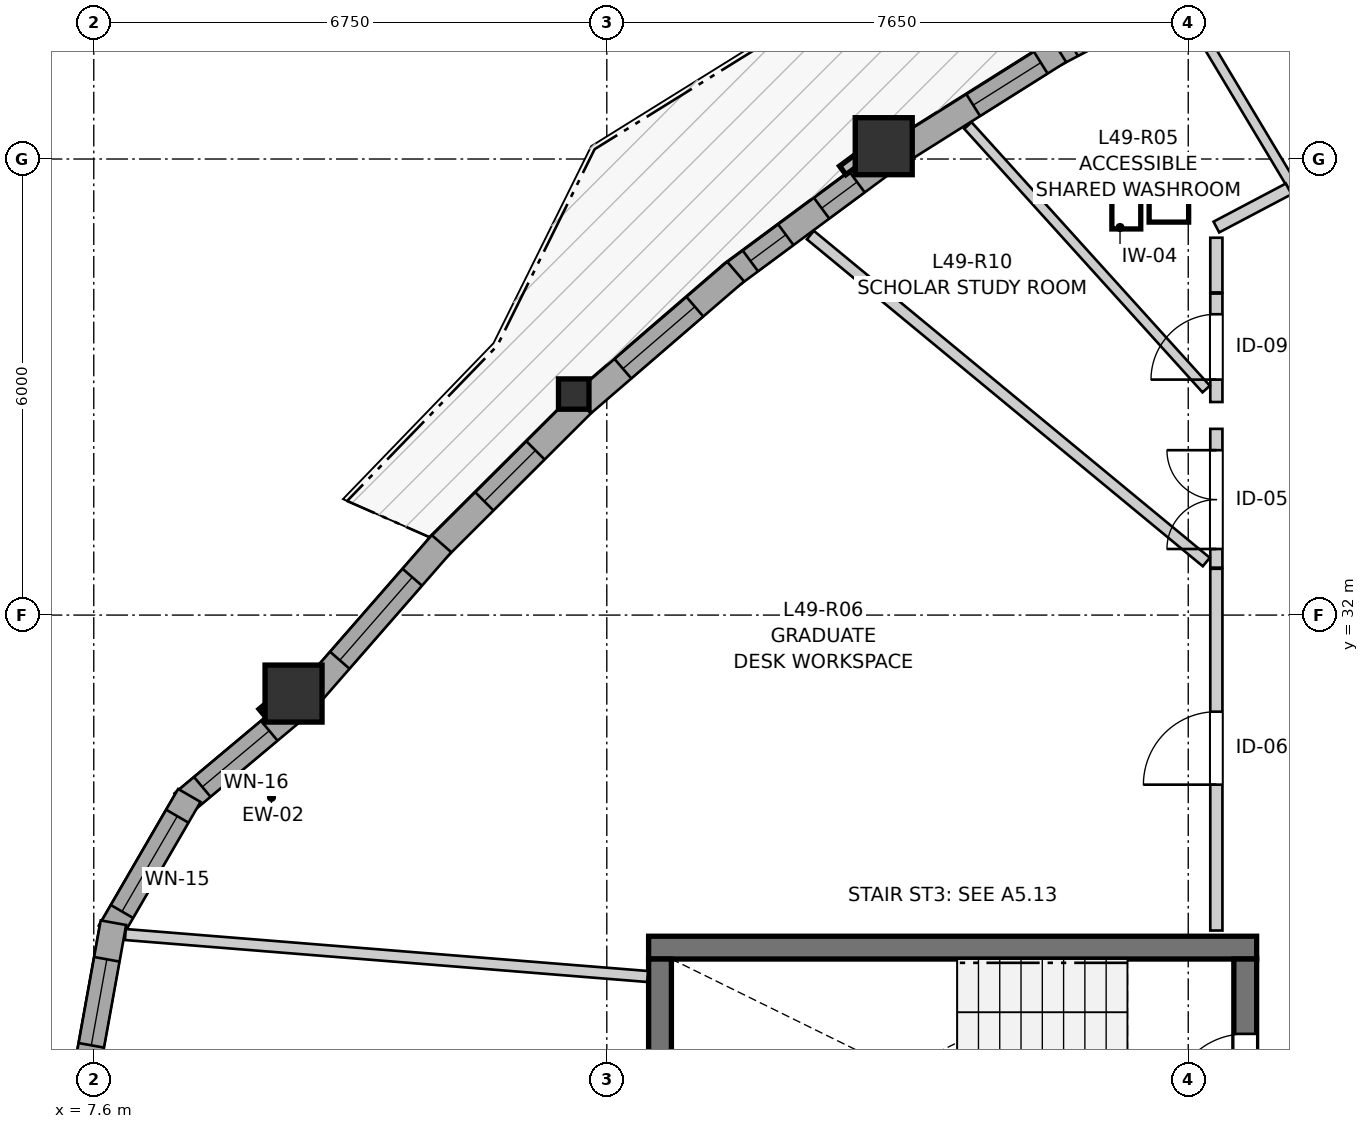
"""IFC4 building model, lengths in metres.
Left out: names, types, materials, properties, quantities, classifications, styles, units other than length and angle.
Written with IfcOpenShell. Run it as: python <this file> out.ifc"""

import sys

from ifc_helpers import new_model, si_unit, direction, frame, frame_2d, origin, origin_2d, place, context, subcontext, project, spatial, rectangle, i_section, extrude, source, transform, mapped, element, fill, save


model = new_model("IFC4")
c1 = context("Model", 3, precision=1e-05, world=origin(), true_north=direction((0.0, 1.0)))
c2 = subcontext(c1, "Body", "Model", "MODEL_VIEW")
j1 = project(units=[si_unit("LENGTHUNIT", "METRE"), si_unit("PLANEANGLEUNIT", "RADIAN")], contexts=[c1])
p1 = place(None, origin())
s1 = spatial("IfcSite", under=j1, at=p1, CompositionType="ELEMENT")
p2 = place(p1, origin())
s2 = spatial("IfcBuilding", under=s1, at=p2, CompositionType="ELEMENT")
p3 = place(p2, frame((0.0, 0.0, 165.0)))
s3 = spatial("IfcBuildingStorey", under=s2, at=p3, CompositionType="ELEMENT", Elevation=165.0)
p4 = place(p3, frame((22.9, 27.625, 0.0), z_axis=(0.0, 0.0, 1.0), x_axis=(-1.0, 0.0, 0.0)))
e1 = element("IfcWall", 1, at=p4, inside=s3, PredefinedType="SHEAR", context=c2, shape_type="SweptSolid", body=[
    extrude(rectangle(XDim=8.0, YDim=0.3, at=frame_2d((4.0, 0.0))), origin(), (0.0, 0.0, 1.0), 2.95),
])
p5 = place(p3, frame((15.05, 27.475, 0.0), z_axis=(0.0, 0.0, 1.0), x_axis=(0.0, -1.0, 0.0)))
e2 = element("IfcWall", 2, at=p5, inside=s3, PredefinedType="SHEAR", context=c2, shape_type="SweptSolid", body=[
    extrude(rectangle(XDim=2.95, YDim=0.3, at=frame_2d((1.475, 0.0))), origin(), (0.0, 0.0, 1.0), 2.95),
])
p6 = place(p3, frame((22.75, 24.525, 0.0), z_axis=(0.0, 0.0, 1.0), x_axis=(0.0, 1.0, 0.0)))
e3 = element("IfcWall", 3, at=p6, inside=s3, PredefinedType="SHEAR", context=c2, shape_type="SweptSolid", body=[
    extrude(rectangle(XDim=2.95, YDim=0.3, at=frame_2d((1.475, 0.0))), origin(), (0.0, 0.0, 1.0), 2.95),
])
p7 = place(p6, frame((0.985, 0.0, 0.0)))
e4 = element("IfcOpeningElement", 4, at=p7, cuts=e3, PredefinedType="OPENING", context=c2, shape_type="SweptSolid", body=[
    extrude(rectangle(XDim=0.98, YDim=2.15, at=frame_2d((0.49, 1.075))), frame((0.0, 0.16, 0.0), z_axis=(0.0, -1.0, 0.0), x_axis=(1.0, 0.0, 0.0)), (0.0, 0.0, 1.0), 0.32),
])
m1 = source(origin(), c2, "Body", "SweptSolid", [
    extrude(rectangle(XDim=0.75, YDim=0.75, at=origin_2d()), origin(), (0.0, 0.0, 1.0), 2.95),
])
for number, where, z_axis, x_axis in (
    (5, (10.229, 30.967, 0.0), (0.0, 0.0, 1.0), (1.0, 0.0, 0.0)),
    (6, (17.994, 38.169, 0.0), (0.0, 0.0, 1.0), (1.0, 0.0, 0.0)),
):
    element("IfcColumn", number, at=place(p3, frame(where, z_axis=z_axis, x_axis=x_axis)), inside=s3, PredefinedType="COLUMN", context=c2, shape_type="MappedRepresentation", body=[
        mapped(m1, transform((0.0, 0.0, 0.0), x_axis=(1.0, 0.0, 0.0), y_axis=(0.0, 1.0, 0.0), z_axis=(0.0, 0.0, 1.0), scale=1.0)),
    ])
m2 = source(origin(), c2, "Body", "SweptSolid", [
    extrude(i_section(OverallWidth=0.401, OverallDepth=0.399, WebThickness=0.023, FlangeThickness=0.036, FilletRadius=0.015, at=origin_2d()), origin(), (0.0, 0.0, 1.0), 2.95),
])
p8 = place(p3, frame((13.915, 34.908, 0.0), z_axis=(0.0, 0.0, 1.0), x_axis=(1.0, 0.0, 0.0)))
e7 = element("IfcColumn", 7, at=p8, inside=s3, PredefinedType="PILASTER", context=c2, shape_type="MappedRepresentation", body=[
    mapped(m2, transform((0.0, 0.0, 0.0), x_axis=(1.0, 0.0, 0.0), y_axis=(0.0, 1.0, 0.0), z_axis=(0.0, 0.0, 1.0), scale=1.0)),
])
p9 = place(p3, frame((10.219, 30.737, 0.0), z_axis=(0.0, 0.0, 1.0), x_axis=(-0.76661852922, -0.642102819381, 0.0)))
e8 = element("IfcWall", 8, at=p9, inside=s3, PredefinedType="SOLIDWALL", context=c2, shape_type="SweptSolid", body=[
    extrude(rectangle(XDim=1.888, YDim=0.34, at=frame_2d((0.944, 0.0))), origin(), (0.0, 0.0, 1.0), 2.53),
])
p10 = place(p9, frame((0.404, 0.0, 0.82)))
e9 = element("IfcOpeningElement", 9, at=p10, cuts=e8, PredefinedType="OPENING", context=c2, shape_type="SweptSolid", body=[
    extrude(rectangle(XDim=1.15, YDim=1.2, at=frame_2d((0.575, 0.6))), frame((0.0, 0.18, 0.0), z_axis=(0.0, -1.0, 0.0), x_axis=(1.0, 0.0, 0.0)), (0.0, 0.0, 1.0), 0.36),
])
p11 = place(p3, frame((8.858, 29.627, 0.0), z_axis=(0.0, 0.0, 1.0), x_axis=(-0.502177965272, -0.864764298058, 0.0)))
e10 = element("IfcWall", 10, at=p11, inside=s3, PredefinedType="SOLIDWALL", context=c2, shape_type="SweptSolid", body=[
    extrude(rectangle(XDim=2.081, YDim=0.34, at=frame_2d((1.041, 0.0))), origin(), (0.0, 0.0, 1.0), 2.53),
])
p12 = place(p11, frame((0.315, 0.0, 0.82)))
e11 = element("IfcOpeningElement", 11, at=p12, cuts=e10, PredefinedType="OPENING", context=c2, shape_type="SweptSolid", body=[
    extrude(rectangle(XDim=1.45, YDim=1.25, at=frame_2d((0.725, 0.625))), frame((0.0, 0.18, 0.0), z_axis=(0.0, -1.0, 0.0), x_axis=(1.0, 0.0, 0.0)), (0.0, 0.0, 1.0), 0.36),
])
p13 = place(p3, frame((7.859, 27.953, 0.0), z_axis=(0.0, 0.0, 1.0), x_axis=(-0.177605215389, -0.984101817632, 0.0)))
e12 = element("IfcWall", 12, at=p13, inside=s3, PredefinedType="SOLIDWALL", context=c2, shape_type="SweptSolid", body=[
    extrude(rectangle(XDim=2.081, YDim=0.34, at=frame_2d((1.041, 0.0))), origin(), (0.0, 0.0, 1.0), 2.53),
])
p14 = place(p13, frame((0.489, 0.0, 0.82)))
e13 = element("IfcOpeningElement", 13, at=p14, cuts=e12, PredefinedType="OPENING", context=c2, shape_type="SweptSolid", body=[
    extrude(rectangle(XDim=1.15, YDim=1.2, at=frame_2d((0.575, 0.6))), frame((0.0, 0.18, 0.0), z_axis=(0.0, -1.0, 0.0), x_axis=(1.0, 0.0, 0.0)), (0.0, 0.0, 1.0), 0.36),
])
p15 = place(p3, frame((22.526, 40.591, 0.0), z_axis=(0.0, 0.0, 1.0), x_axis=(-0.884394438343, -0.46674026763, 0.0)))
e14 = element("IfcWall", 14, at=p15, inside=s3, PredefinedType="SOLIDWALL", context=c2, shape_type="SweptSolid", body=[
    extrude(rectangle(XDim=2.601, YDim=0.34, at=frame_2d((1.301, 0.0))), origin(), (0.0, 0.0, 1.0), 2.53),
])
p16 = place(p15, frame((0.977, 0.0, 0.82)))
e15 = element("IfcOpeningElement", 15, at=p16, cuts=e14, PredefinedType="OPENING", context=c2, shape_type="SweptSolid", body=[
    extrude(rectangle(XDim=1.35, YDim=1.45, at=frame_2d((0.675, 0.725))), frame((0.0, 0.18, 0.0), z_axis=(0.0, -1.0, 0.0), x_axis=(1.0, 0.0, 0.0)), (0.0, 0.0, 1.0), 0.36),
])
p17 = place(p3, frame((20.303, 39.421, 0.0), z_axis=(0.0, 0.0, 1.0), x_axis=(-0.846381586821, -0.532576951707, 0.0)))
e16 = element("IfcWall", 16, at=p17, inside=s3, PredefinedType="SOLIDWALL", context=c2, shape_type="SweptSolid", body=[
    extrude(rectangle(XDim=2.466, YDim=0.34, at=frame_2d((1.233, 0.0))), origin(), (0.0, 0.0, 1.0), 2.53),
])
p18 = place(p17, frame((0.287, 0.0, 0.82)))
e17 = element("IfcOpeningElement", 17, at=p18, cuts=e16, PredefinedType="OPENING", context=c2, shape_type="SweptSolid", body=[
    extrude(rectangle(XDim=1.05, YDim=1.45, at=frame_2d((0.525, 0.725))), frame((0.0, 0.18, 0.0), z_axis=(0.0, -1.0, 0.0), x_axis=(1.0, 0.0, 0.0)), (0.0, 0.0, 1.0), 0.36),
])
p19 = place(p3, frame((17.97, 37.94, 0.0), z_axis=(0.0, 0.0, 1.0), x_axis=(-0.803844722302, -0.594839190393, 0.0)))
e18 = element("IfcWall", 18, at=p19, inside=s3, PredefinedType="SOLIDWALL", context=c2, shape_type="SweptSolid", body=[
    extrude(rectangle(XDim=2.481, YDim=0.34, at=frame_2d((1.24, 0.0))), origin(), (0.0, 0.0, 1.0), 2.53),
])
p20 = place(p19, frame((0.407, 0.0, 0.82)))
e19 = element("IfcOpeningElement", 19, at=p20, cuts=e18, PredefinedType="OPENING", context=c2, shape_type="SweptSolid", body=[
    extrude(rectangle(XDim=0.58, YDim=1.35, at=frame_2d((0.29, 0.675))), frame((0.0, 0.18, 0.0), z_axis=(0.0, -1.0, 0.0), x_axis=(1.0, 0.0, 0.0)), (0.0, 0.0, 1.0), 0.36),
])
p21 = place(p19, frame((1.573, 0.0, 0.82)))
e20 = element("IfcOpeningElement", 20, at=p21, cuts=e18, PredefinedType="OPENING", context=c2, shape_type="SweptSolid", body=[
    extrude(rectangle(XDim=0.58, YDim=1.35, at=frame_2d((0.29, 0.675))), frame((0.0, 0.18, 0.0), z_axis=(0.0, -1.0, 0.0), x_axis=(1.0, 0.0, 0.0)), (0.0, 0.0, 1.0), 0.36),
])
p22 = place(p3, frame((16.045, 36.519, 0.0), z_axis=(0.0, 0.0, 1.0), x_axis=(-0.757449302754, -0.652893983551, 0.0)))
e21 = element("IfcWall", 21, at=p22, inside=s3, PredefinedType="SOLIDWALL", context=c2, shape_type="SweptSolid", body=[
    extrude(rectangle(XDim=2.646, YDim=0.34, at=frame_2d((1.323, 0.0))), origin(), (0.0, 0.0, 1.0), 2.53),
])
p23 = place(p22, frame((0.708, 0.0, 0.82)))
e22 = element("IfcOpeningElement", 22, at=p23, cuts=e21, PredefinedType="OPENING", context=c2, shape_type="SweptSolid", body=[
    extrude(rectangle(XDim=1.25, YDim=1.35, at=frame_2d((0.625, 0.675))), frame((0.0, 0.18, 0.0), z_axis=(0.0, -1.0, 0.0), x_axis=(1.0, 0.0, 0.0)), (0.0, 0.0, 1.0), 0.36),
])
p24 = place(p3, frame((14.021, 34.773, 0.0), z_axis=(0.0, 0.0, 1.0), x_axis=(-0.708421987765, -0.705789123784, 0.0)))
e23 = element("IfcWall", 23, at=p24, inside=s3, PredefinedType="SOLIDWALL", context=c2, shape_type="SweptSolid", body=[
    extrude(rectangle(XDim=2.689, YDim=0.34, at=frame_2d((1.345, 0.0))), origin(), (0.0, 0.0, 1.0), 2.53),
])
p25 = place(p24, frame((0.86, 0.0, 0.82)))
e24 = element("IfcOpeningElement", 24, at=p25, cuts=e23, PredefinedType="OPENING", context=c2, shape_type="SweptSolid", body=[
    extrude(rectangle(XDim=0.95, YDim=1.35, at=frame_2d((0.475, 0.675))), frame((0.0, 0.18, 0.0), z_axis=(0.0, -1.0, 0.0), x_axis=(1.0, 0.0, 0.0)), (0.0, 0.0, 1.0), 0.36),
])
p26 = place(p3, frame((12.176, 32.939, 0.0), z_axis=(0.0, 0.0, 1.0), x_axis=(-0.65766354423, -0.753311796397, 0.0)))
e25 = element("IfcWall", 25, at=p26, inside=s3, PredefinedType="SOLIDWALL", context=c2, shape_type="SweptSolid", body=[
    extrude(rectangle(XDim=2.611, YDim=0.34, at=frame_2d((1.306, 0.0))), origin(), (0.0, 0.0, 1.0), 2.53),
])
p27 = place(p26, frame((0.586, 0.0, 0.82)))
e26 = element("IfcOpeningElement", 26, at=p27, cuts=e25, PredefinedType="OPENING", context=c2, shape_type="SweptSolid", body=[
    extrude(rectangle(XDim=1.45, YDim=1.25, at=frame_2d((0.725, 0.625))), frame((0.0, 0.18, 0.0), z_axis=(0.0, -1.0, 0.0), x_axis=(1.0, 0.0, 0.0)), (0.0, 0.0, 1.0), 0.36),
])
p28 = place(p3, frame((22.37, 27.85, 0.0), z_axis=(0.0, 0.0, 1.0), x_axis=(0.0, 1.0, 0.0)))
e27 = element("IfcWall", 27, at=p28, inside=s3, PredefinedType="PARTITIONING", context=c2, shape_type="SweptSolid", body=[
    extrude(rectangle(XDim=4.759, YDim=0.16, at=frame_2d((2.379, 0.0))), origin(), (0.0, 0.0, 1.0), 2.95),
])
p29 = place(p28, frame((1.919, 0.0, 0.0)))
e28 = element("IfcOpeningElement", 28, at=p29, cuts=e27, PredefinedType="OPENING", context=c2, shape_type="SweptSolid", body=[
    extrude(rectangle(XDim=0.96, YDim=2.1, at=frame_2d((0.48, 1.05))), frame((0.0, 0.09, 0.0), z_axis=(0.0, -1.0, 0.0), x_axis=(1.0, 0.0, 0.0)), (0.0, 0.0, 1.0), 0.18),
])
p30 = place(p3, frame((22.37, 32.624, 0.0), z_axis=(0.0, 0.0, 1.0), x_axis=(0.0, 1.0, 0.0)))
e29 = element("IfcWall", 29, at=p30, inside=s3, PredefinedType="PARTITIONING", context=c2, shape_type="SweptSolid", body=[
    extrude(rectangle(XDim=1.826, YDim=0.16, at=frame_2d((0.913, 0.0))), origin(), (0.0, 0.0, 1.0), 2.95),
])
p31 = place(p30, frame((0.246, 0.0, 0.0)))
e30 = element("IfcOpeningElement", 30, at=p31, cuts=e29, PredefinedType="OPENING", context=c2, shape_type="SweptSolid", body=[
    extrude(rectangle(XDim=1.3, YDim=2.1, at=frame_2d((0.65, 1.05))), frame((0.0, 0.09, 0.0), z_axis=(0.0, -1.0, 0.0), x_axis=(1.0, 0.0, 0.0)), (0.0, 0.0, 1.0), 0.18),
])
p32 = place(p3, frame((22.37, 34.803, 0.0), z_axis=(0.0, 0.0, 1.0), x_axis=(0.0, 1.0, 0.0)))
e31 = element("IfcWall", 31, at=p32, inside=s3, PredefinedType="PARTITIONING", context=c2, shape_type="SweptSolid", body=[
    extrude(rectangle(XDim=1.427, YDim=0.16, at=frame_2d((0.713, 0.0))), origin(), (0.0, 0.0, 1.0), 2.95),
])
p33 = place(p32, frame((0.295, 0.0, 0.0)))
e32 = element("IfcOpeningElement", 32, at=p33, cuts=e31, PredefinedType="OPENING", context=c2, shape_type="SweptSolid", body=[
    extrude(rectangle(XDim=0.86, YDim=2.05, at=frame_2d((0.43, 1.025))), frame((0.0, 0.09, 0.0), z_axis=(0.0, -1.0, 0.0), x_axis=(1.0, 0.0, 0.0)), (0.0, 0.0, 1.0), 0.18),
])
p34 = place(p3, frame((17.028, 37.0, 0.0), z_axis=(0.0, 0.0, 1.0), x_axis=(0.771119105053, -0.636690918596, 0.0)))
e33 = element("IfcWall", 33, at=p34, inside=s3, PredefinedType="PARTITIONING", context=c2, shape_type="SweptSolid", body=[
    extrude(rectangle(XDim=6.756, YDim=0.145, at=frame_2d((3.378, 0.0))), origin(), (0.0, 0.0, 1.0), 2.95),
])
p35 = place(p3, frame((8.015, 27.797, 0.0), z_axis=(0.0, 0.0, 1.0), x_axis=(0.996785477909, -0.080116858581, 0.0)))
e34 = element("IfcWall", 34, at=p35, inside=s3, PredefinedType="PARTITIONING", context=c2, shape_type="SweptSolid", body=[
    extrude(rectangle(XDim=6.893, YDim=0.145, at=frame_2d((3.447, 0.0))), origin(), (0.0, 0.0, 1.0), 2.95),
])
p36 = place(p3, frame((19.101, 38.441, 0.0), z_axis=(0.0, 0.0, 1.0), x_axis=(0.670702711046, -0.741726279295, 0.0)))
e35 = element("IfcWall", 35, at=p36, inside=s3, PredefinedType="PARTITIONING", context=c2, shape_type="SweptSolid", body=[
    extrude(rectangle(XDim=4.675, YDim=0.13, at=frame_2d((2.337, 0.0))), origin(), (0.0, 0.0, 1.0), 2.95),
])
p37 = place(p3, frame((21.92, 40.065, 0.0), z_axis=(0.0, 0.0, 1.0), x_axis=(0.514051974364, -0.857759038223, 0.0)))
e36 = element("IfcWall", 36, at=p37, inside=s3, PredefinedType="PARTITIONING", context=c2, shape_type="SweptSolid", body=[
    extrude(rectangle(XDim=2.832, YDim=0.13, at=frame_2d((1.416, 0.0))), origin(), (0.0, 0.0, 1.0), 2.95),
])
p38 = place(p3, frame((22.37, 37.105, 0.0), z_axis=(0.0, 0.0, 1.0), x_axis=(0.884455008011, 0.466625480234, 0.0)))
e37 = element("IfcWall", 37, at=p38, inside=s3, PredefinedType="PARTITIONING", context=c2, shape_type="SweptSolid", body=[
    extrude(rectangle(XDim=1.076, YDim=0.16, at=frame_2d((0.538, 0.0))), origin(), (0.0, 0.0, 1.0), 2.558),
])
p39 = place(p3, frame((22.37, 36.245, 0.0), z_axis=(0.0, 0.0, 1.0), x_axis=(0.0, 1.0, 0.0)))
e38 = element("IfcWall", 38, at=p39, inside=s3, PredefinedType="PARTITIONING", context=c2, shape_type="SweptSolid", body=[
    extrude(rectangle(XDim=0.719, YDim=0.16, at=frame_2d((0.36, 0.0))), origin(), (0.0, 0.0, 1.0), 2.95),
])
m3 = source(origin(), c2, "Body", "SweptSolid", [
    extrude(rectangle(XDim=1.15, YDim=1.2, at=frame_2d((0.575, 0.6))), frame((0.0, 0.03, 0.0), z_axis=(0.0, -1.0, 0.0), x_axis=(1.0, 0.0, 0.0)), (0.0, 0.0, 1.0), 0.06),
])
p40 = place(p10, origin())
e39 = element("IfcWindow", 39, at=p40, inside=s3, PartitioningType="SINGLE_PANEL", PredefinedType="WINDOW", context=c2, shape_type="MappedRepresentation", body=[
    mapped(m3, transform((0.0, 0.0, 0.0), x_axis=(1.0, 0.0, 0.0), y_axis=(0.0, 1.0, 0.0), z_axis=(0.0, 0.0, 1.0), scale=1.0)),
])
fill(e9, e39)
m4 = source(origin(), c2, "Body", "SweptSolid", [
    extrude(rectangle(XDim=1.45, YDim=1.25, at=frame_2d((0.725, 0.625))), frame((0.0, 0.03, 0.0), z_axis=(0.0, -1.0, 0.0), x_axis=(1.0, 0.0, 0.0)), (0.0, 0.0, 1.0), 0.06),
])
p41 = place(p12, origin())
e40 = element("IfcWindow", 40, at=p41, inside=s3, PartitioningType="SINGLE_PANEL", PredefinedType="WINDOW", context=c2, shape_type="MappedRepresentation", body=[
    mapped(m4, transform((0.0, 0.0, 0.0), x_axis=(1.0, 0.0, 0.0), y_axis=(0.0, 1.0, 0.0), z_axis=(0.0, 0.0, 1.0), scale=1.0)),
])
fill(e11, e40)
p42 = place(p14, origin())
e41 = element("IfcWindow", 41, at=p42, inside=s3, PartitioningType="SINGLE_PANEL", PredefinedType="WINDOW", context=c2, shape_type="MappedRepresentation", body=[
    mapped(m3, transform((0.0, 0.0, 0.0), x_axis=(1.0, 0.0, 0.0), y_axis=(0.0, 1.0, 0.0), z_axis=(0.0, 0.0, 1.0), scale=1.0)),
])
fill(e13, e41)
m5 = source(origin(), c2, "Body", "SweptSolid", [
    extrude(rectangle(XDim=1.05, YDim=1.45, at=frame_2d((0.525, 0.725))), frame((0.0, 0.03, 0.0), z_axis=(0.0, -1.0, 0.0), x_axis=(1.0, 0.0, 0.0)), (0.0, 0.0, 1.0), 0.06),
])
p43 = place(p18, origin())
e42 = element("IfcWindow", 42, at=p43, inside=s3, PartitioningType="SINGLE_PANEL", PredefinedType="WINDOW", context=c2, shape_type="MappedRepresentation", body=[
    mapped(m5, transform((0.0, 0.0, 0.0), x_axis=(1.0, 0.0, 0.0), y_axis=(0.0, 1.0, 0.0), z_axis=(0.0, 0.0, 1.0), scale=1.0)),
])
fill(e17, e42)
m6 = source(origin(), c2, "Body", "SweptSolid", [
    extrude(rectangle(XDim=0.58, YDim=1.35, at=frame_2d((0.29, 0.675))), frame((0.0, 0.03, 0.0), z_axis=(0.0, -1.0, 0.0), x_axis=(1.0, 0.0, 0.0)), (0.0, 0.0, 1.0), 0.06),
])
p44 = place(p20, origin())
e43 = element("IfcWindow", 43, at=p44, inside=s3, PartitioningType="SINGLE_PANEL", PredefinedType="WINDOW", context=c2, shape_type="MappedRepresentation", body=[
    mapped(m6, transform((0.0, 0.0, 0.0), x_axis=(1.0, 0.0, 0.0), y_axis=(0.0, 1.0, 0.0), z_axis=(0.0, 0.0, 1.0), scale=1.0)),
])
fill(e19, e43)
p45 = place(p21, origin())
e44 = element("IfcWindow", 44, at=p45, inside=s3, PartitioningType="SINGLE_PANEL", PredefinedType="WINDOW", context=c2, shape_type="MappedRepresentation", body=[
    mapped(m6, transform((0.0, 0.0, 0.0), x_axis=(1.0, 0.0, 0.0), y_axis=(0.0, 1.0, 0.0), z_axis=(0.0, 0.0, 1.0), scale=1.0)),
])
fill(e20, e44)
m7 = source(origin(), c2, "Body", "SweptSolid", [
    extrude(rectangle(XDim=1.25, YDim=1.35, at=frame_2d((0.625, 0.675))), frame((0.0, 0.03, 0.0), z_axis=(0.0, -1.0, 0.0), x_axis=(1.0, 0.0, 0.0)), (0.0, 0.0, 1.0), 0.06),
])
p46 = place(p23, origin())
e45 = element("IfcWindow", 45, at=p46, inside=s3, PartitioningType="SINGLE_PANEL", PredefinedType="WINDOW", context=c2, shape_type="MappedRepresentation", body=[
    mapped(m7, transform((0.0, 0.0, 0.0), x_axis=(1.0, 0.0, 0.0), y_axis=(0.0, 1.0, 0.0), z_axis=(0.0, 0.0, 1.0), scale=1.0)),
])
fill(e22, e45)
m8 = source(origin(), c2, "Body", "SweptSolid", [
    extrude(rectangle(XDim=0.95, YDim=1.35, at=frame_2d((0.475, 0.675))), frame((0.0, 0.03, 0.0), z_axis=(0.0, -1.0, 0.0), x_axis=(1.0, 0.0, 0.0)), (0.0, 0.0, 1.0), 0.06),
])
p47 = place(p25, origin())
e46 = element("IfcWindow", 46, at=p47, inside=s3, PartitioningType="SINGLE_PANEL", PredefinedType="WINDOW", context=c2, shape_type="MappedRepresentation", body=[
    mapped(m8, transform((0.0, 0.0, 0.0), x_axis=(1.0, 0.0, 0.0), y_axis=(0.0, 1.0, 0.0), z_axis=(0.0, 0.0, 1.0), scale=1.0)),
])
fill(e24, e46)
p48 = place(p27, origin())
e47 = element("IfcWindow", 47, at=p48, inside=s3, PartitioningType="SINGLE_PANEL", PredefinedType="WINDOW", context=c2, shape_type="MappedRepresentation", body=[
    mapped(m4, transform((0.0, 0.0, 0.0), x_axis=(1.0, 0.0, 0.0), y_axis=(0.0, 1.0, 0.0), z_axis=(0.0, 0.0, 1.0), scale=1.0)),
])
fill(e26, e47)
m9 = source(origin(), c2, "Body", "SweptSolid", [
    extrude(rectangle(XDim=0.98, YDim=2.15, at=frame_2d((0.49, 1.075))), frame((0.0, 0.025, 0.0), z_axis=(0.0, -1.0, 0.0), x_axis=(1.0, 0.0, 0.0)), (0.0, 0.0, 1.0), 0.05),
])
p49 = place(p7, origin())
e48 = element("IfcDoor", 48, at=p49, inside=s3, OperationType="SINGLE_SWING_LEFT", PredefinedType="DOOR", context=c2, shape_type="MappedRepresentation", body=[
    mapped(m9, transform((0.0, 0.0, 0.0), x_axis=(1.0, 0.0, 0.0), y_axis=(0.0, 1.0, 0.0), z_axis=(0.0, 0.0, 1.0), scale=1.0)),
])
fill(e4, e48)
m10 = source(origin(), c2, "Body", "SweptSolid", [
    extrude(rectangle(XDim=0.96, YDim=2.1, at=frame_2d((0.48, 1.05))), frame((0.0, 0.025, 0.0), z_axis=(0.0, -1.0, 0.0), x_axis=(1.0, 0.0, 0.0)), (0.0, 0.0, 1.0), 0.05),
])
p50 = place(p29, origin())
e49 = element("IfcDoor", 49, at=p50, inside=s3, OperationType="SINGLE_SWING_LEFT", PredefinedType="DOOR", context=c2, shape_type="MappedRepresentation", body=[
    mapped(m10, transform((0.0, 0.0, 0.0), x_axis=(1.0, 0.0, 0.0), y_axis=(0.0, 1.0, 0.0), z_axis=(0.0, 0.0, 1.0), scale=1.0)),
])
fill(e28, e49)
m11 = source(origin(), c2, "Body", "SweptSolid", [
    extrude(rectangle(XDim=1.3, YDim=2.1, at=frame_2d((0.65, 1.05))), frame((0.0, 0.025, 0.0), z_axis=(0.0, -1.0, 0.0), x_axis=(1.0, 0.0, 0.0)), (0.0, 0.0, 1.0), 0.05),
])
p51 = place(p31, origin())
e50 = element("IfcDoor", 50, at=p51, inside=s3, OperationType="DOUBLE_DOOR_SINGLE_SWING", PredefinedType="DOOR", context=c2, shape_type="MappedRepresentation", body=[
    mapped(m11, transform((0.0, 0.0, 0.0), x_axis=(1.0, 0.0, 0.0), y_axis=(0.0, 1.0, 0.0), z_axis=(0.0, 0.0, 1.0), scale=1.0)),
])
fill(e30, e50)
m12 = source(origin(), c2, "Body", "SweptSolid", [
    extrude(rectangle(XDim=0.86, YDim=2.05, at=frame_2d((0.43, 1.025))), frame((0.0, 0.025, 0.0), z_axis=(0.0, -1.0, 0.0), x_axis=(1.0, 0.0, 0.0)), (0.0, 0.0, 1.0), 0.05),
])
p52 = place(p33, origin())
e51 = element("IfcDoor", 51, at=p52, inside=s3, OperationType="SINGLE_SWING_LEFT", PredefinedType="DOOR", context=c2, shape_type="MappedRepresentation", body=[
    mapped(m12, transform((0.0, 0.0, 0.0), x_axis=(1.0, 0.0, 0.0), y_axis=(0.0, 1.0, 0.0), z_axis=(0.0, 0.0, 1.0), scale=1.0)),
])
fill(e32, e51)
save(model, sys.argv[1])
